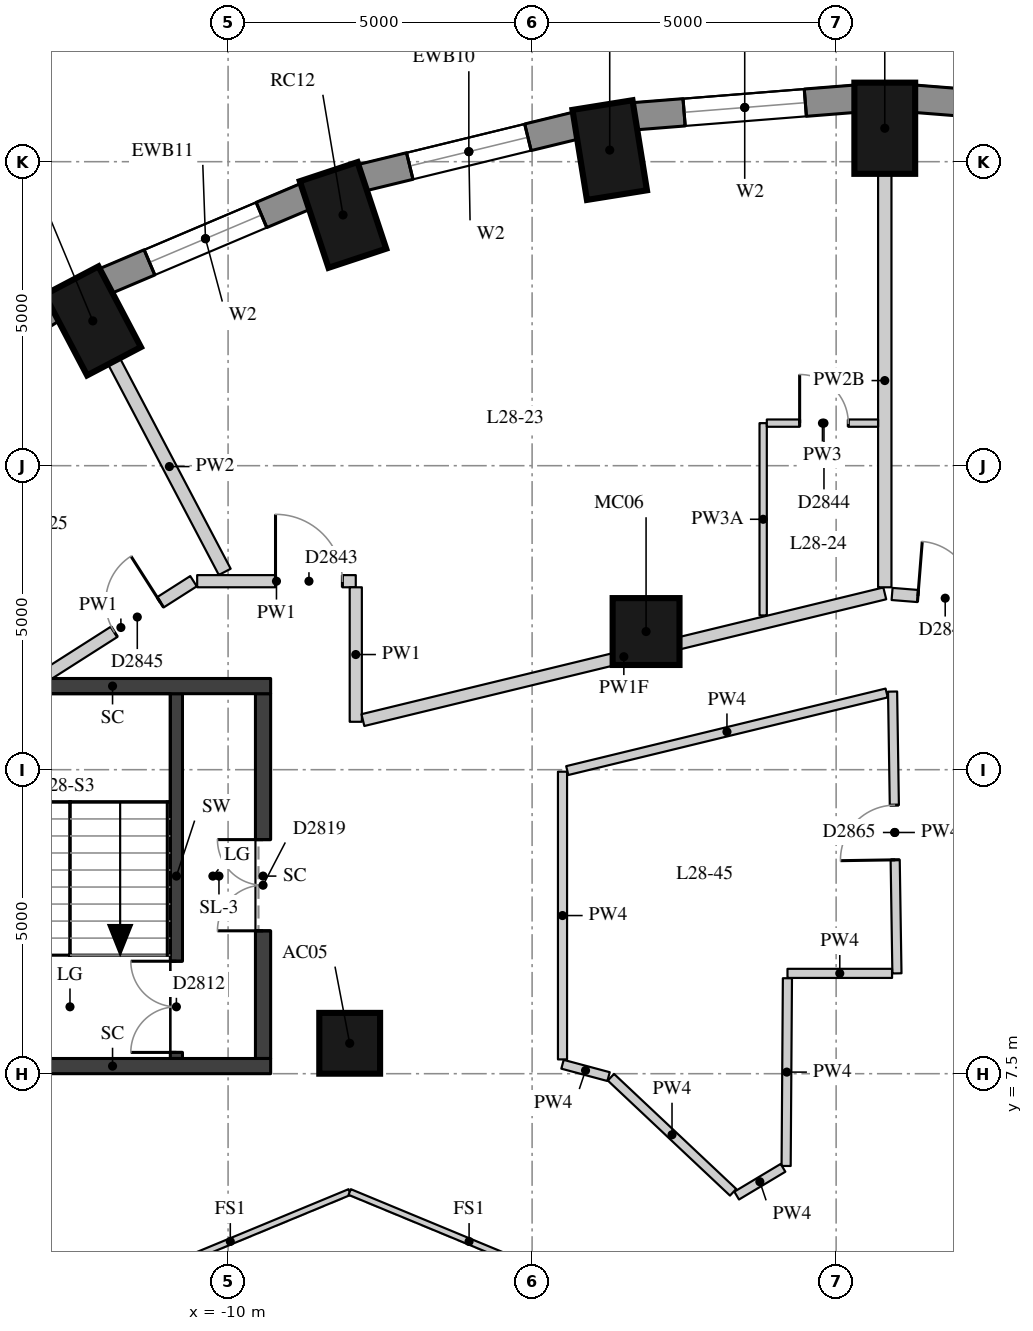
"""IFC4 building model, lengths in metres.
Left out: names, types, materials, properties, quantities, classifications, styles, units other than length and angle.
Written with IfcOpenShell. Run it as: python <this file> out.ifc"""

import sys

from ifc_helpers import new_model, si_unit, direction, frame, frame_2d, origin, origin_2d, place, context, subcontext, project, spatial, rectangle, extrude, element, fill, save


model = new_model("IFC4")
c1 = context("Model", 3, precision=1e-05, world=origin(), true_north=direction((0.0, 1.0)))
c2 = subcontext(c1, "Body", "Model", "MODEL_VIEW")
j1 = project(units=[si_unit("LENGTHUNIT", "METRE"), si_unit("PLANEANGLEUNIT", "RADIAN")], contexts=[c1])
p1 = place(None, origin())
s1 = spatial("IfcSite", under=j1, at=p1, CompositionType="ELEMENT")
p2 = place(p1, origin())
s2 = spatial("IfcBuilding", under=s1, at=p2, CompositionType="ELEMENT")
p3 = place(p2, frame((0.0, 0.0, 102.1)))
s3 = spatial("IfcBuildingStorey", under=s2, at=p3, CompositionType="ELEMENT", Elevation=102.1)
for number, where, z_axis, x_axis in (
    (1, (0.8, 23.05, 0.0), (0.0, 0.0, 1.0), (0.0, 1.0, 0.0)),
    (2, (-3.724, 22.691, 0.0), (0.0, 0.0, 1.0), (-0.159, 0.987, 0.0)),
    (3, (-8.11, 21.624, 0.0), (0.0, 0.0, 1.0), (-0.315, 0.949, 0.0)),
    (4, (-12.225, 19.882, 0.0), (0.0, 0.0, 1.0), (-0.465, 0.885, 0.0)),
):
    element("IfcColumn", number, at=place(p3, frame(where, z_axis=z_axis, x_axis=x_axis)), inside=s3, PredefinedType="COLUMN", context=c2, shape_type="SweptSolid", body=[
        extrude(rectangle(XDim=1.5, YDim=1.0, at=origin_2d()), origin(), (0.0, 0.0, 1.0), 3.3),
    ])
p4 = place(p3, frame((-8.0, 8.0, 0.0), z_axis=(0.0, 0.0, 1.0), x_axis=(1.0, 0.0, 0.0)))
e5 = element("IfcColumn", 5, at=p4, inside=s3, PredefinedType="COLUMN", context=c2, shape_type="SweptSolid", body=[
    extrude(rectangle(XDim=1.0, YDim=1.0, at=origin_2d()), origin(), (0.0, 0.0, 1.0), 3.3),
])
p5 = place(p3, frame((-3.126, 14.772, 0.0), z_axis=(0.0, 0.0, 1.0), x_axis=(1.0, 0.0, 0.0)))
e6 = element("IfcColumn", 6, at=p5, inside=s3, PredefinedType="COLUMN", context=c2, shape_type="SweptSolid", body=[
    extrude(rectangle(XDim=1.1, YDim=1.1, at=origin_2d()), origin(), (0.0, 0.0, 1.0), 3.3),
])
p6 = place(p3, frame((4.927, 23.247, 0.0), z_axis=(0.0, 0.0, 1.0), x_axis=(-0.996862216754, 0.079156306178, 0.0)))
e7 = element("IfcWall", 7, at=p6, inside=s3, PredefinedType="SOLIDWALL", context=c2, shape_type="SweptSolid", body=[
    extrude(rectangle(XDim=3.658, YDim=0.45, at=frame_2d((1.829, 0.0))), origin(), (0.0, 0.0, 1.0), 3.02),
])
p7 = place(p6, frame((0.829, 0.0, 0.4)))
e8 = element("IfcOpeningElement", 8, at=p7, cuts=e7, PredefinedType="OPENING", context=c2, shape_type="SweptSolid", body=[
    extrude(rectangle(XDim=2.0, YDim=1.75, at=frame_2d((1.0, 0.875))), frame((0.0, 0.235, 0.0), z_axis=(0.0, -1.0, 0.0), x_axis=(1.0, 0.0, 0.0)), (0.0, 0.0, 1.0), 0.47),
])
p8 = place(p3, frame((0.32, 23.536, 0.0), z_axis=(0.0, 0.0, 1.0), x_axis=(-0.996862216754, -0.079156306178, 0.0)))
e9 = element("IfcWall", 9, at=p8, inside=s3, PredefinedType="SOLIDWALL", context=c2, shape_type="SweptSolid", body=[
    extrude(rectangle(XDim=3.658, YDim=0.45, at=frame_2d((1.829, 0.0))), origin(), (0.0, 0.0, 1.0), 3.02),
])
p9 = place(p8, frame((0.829, 0.0, 0.4)))
e10 = element("IfcOpeningElement", 10, at=p9, cuts=e9, PredefinedType="OPENING", context=c2, shape_type="SweptSolid", body=[
    extrude(rectangle(XDim=2.0, YDim=1.75, at=frame_2d((1.0, 0.875))), frame((0.0, 0.235, 0.0), z_axis=(0.0, -1.0, 0.0), x_axis=(1.0, 0.0, 0.0)), (0.0, 0.0, 1.0), 0.47),
])
p10 = place(p3, frame((-4.275, 23.094, 0.0), z_axis=(0.0, 0.0, 1.0), x_axis=(-0.971667603162, -0.236351579148, 0.0)))
e11 = element("IfcWall", 11, at=p10, inside=s3, PredefinedType="SOLIDWALL", context=c2, shape_type="SweptSolid", body=[
    extrude(rectangle(XDim=3.635, YDim=0.45, at=frame_2d((1.817, 0.0))), origin(), (0.0, 0.0, 1.0), 3.02),
])
p11 = place(p10, frame((0.817, 0.0, 0.4)))
e12 = element("IfcOpeningElement", 12, at=p11, cuts=e11, PredefinedType="OPENING", context=c2, shape_type="SweptSolid", body=[
    extrude(rectangle(XDim=2.0, YDim=1.75, at=frame_2d((1.0, 0.875))), frame((0.0, 0.235, 0.0), z_axis=(0.0, -1.0, 0.0), x_axis=(1.0, 0.0, 0.0)), (0.0, 0.0, 1.0), 0.47),
])
p12 = place(p3, frame((-8.718, 21.934, 0.0), z_axis=(0.0, 0.0, 1.0), x_axis=(-0.920879975612, -0.389846213932, 0.0)))
e13 = element("IfcWall", 13, at=p12, inside=s3, PredefinedType="SOLIDWALL", context=c2, shape_type="SweptSolid", body=[
    extrude(rectangle(XDim=3.592, YDim=0.45, at=frame_2d((1.796, 0.0))), origin(), (0.0, 0.0, 1.0), 3.02),
])
p13 = place(p12, frame((0.796, 0.0, 0.4)))
e14 = element("IfcOpeningElement", 14, at=p13, cuts=e13, PredefinedType="OPENING", context=c2, shape_type="SweptSolid", body=[
    extrude(rectangle(XDim=2.0, YDim=1.75, at=frame_2d((1.0, 0.875))), frame((0.0, 0.235, 0.0), z_axis=(0.0, -1.0, 0.0), x_axis=(1.0, 0.0, 0.0)), (0.0, 0.0, 1.0), 0.47),
])
p14 = place(p3, frame((-12.875, 20.087, 0.0), z_axis=(0.0, 0.0, 1.0), x_axis=(-0.843860651879, -0.536562391722, 0.0)))
e15 = element("IfcWall", 15, at=p14, inside=s3, PredefinedType="SOLIDWALL", context=c2, shape_type="SweptSolid", body=[
    extrude(rectangle(XDim=3.532, YDim=0.45, at=frame_2d((1.766, 0.0))), origin(), (0.0, 0.0, 1.0), 3.02),
])
p15 = place(p14, frame((0.766, 0.0, 0.4)))
e16 = element("IfcOpeningElement", 16, at=p15, cuts=e15, PredefinedType="OPENING", context=c2, shape_type="SweptSolid", body=[
    extrude(rectangle(XDim=2.0, YDim=1.75, at=frame_2d((1.0, 0.875))), frame((0.0, 0.235, 0.0), z_axis=(0.0, -1.0, 0.0), x_axis=(1.0, 0.0, 0.0)), (0.0, 0.0, 1.0), 0.47),
])
p16 = place(p3, frame((-10.85, 7.75, 0.0), z_axis=(0.0, 0.0, 1.0), x_axis=(0.0, 1.0, 0.0)))
e17 = element("IfcWall", 17, at=p16, inside=s3, PredefinedType="SHEAR", context=c2, shape_type="SweptSolid", body=[
    extrude(rectangle(XDim=6.0, YDim=0.2, at=frame_2d((3.0, 0.0))), origin(), (0.0, 0.0, 1.0), 3.02),
])
p17 = place(p16, frame((0.1, 0.0, 0.0)))
e18 = element("IfcOpeningElement", 18, at=p17, cuts=e17, PredefinedType="OPENING", context=c2, shape_type="SweptSolid", body=[
    extrude(rectangle(XDim=1.5, YDim=2.1, at=frame_2d((0.75, 1.05))), frame((0.0, 0.11, 0.0), z_axis=(0.0, -1.0, 0.0), x_axis=(1.0, 0.0, 0.0)), (0.0, 0.0, 1.0), 0.22),
])
p18 = place(p3, frame((-9.425, 7.75, -0.28), z_axis=(0.0, 0.0, 1.0), x_axis=(0.0, 1.0, 0.0)))
e19 = element("IfcWall", 19, at=p18, inside=s3, PredefinedType="SHEAR", context=c2, shape_type="SweptSolid", body=[
    extrude(rectangle(XDim=6.0, YDim=0.25, at=frame_2d((3.0, 0.0))), origin(), (0.0, 0.0, 1.0), 3.3),
])
p19 = place(p18, frame((2.1, 0.0, 0.28)))
e20 = element("IfcOpeningElement", 20, at=p19, cuts=e19, PredefinedType="OPENING", context=c2, shape_type="SweptSolid", body=[
    extrude(rectangle(XDim=1.5, YDim=2.1, at=frame_2d((0.75, 1.05))), frame((0.0, 0.135, 0.0), z_axis=(0.0, -1.0, 0.0), x_axis=(1.0, 0.0, 0.0)), (0.0, 0.0, 1.0), 0.27),
])
for number, where, z_axis, x_axis in (
    (21, (-14.5, 13.875, -0.28), (0.0, 0.0, 1.0), (1.0, 0.0, 0.0)),
    (22, (-14.5, 7.625, -0.28), (0.0, 0.0, 1.0), (1.0, 0.0, 0.0)),
):
    element("IfcWall", number, at=place(p3, frame(where, z_axis=z_axis, x_axis=x_axis)), inside=s3, PredefinedType="SHEAR", context=c2, shape_type="SweptSolid", body=[
        extrude(rectangle(XDim=5.2, YDim=0.25, at=frame_2d((2.6, 0.0))), origin(), (0.0, 0.0, 1.0), 3.3),
    ])
p20 = place(p3, frame((-12.957, 14.077, 0.0), z_axis=(0.0, 0.0, 1.0), x_axis=(0.84319985174, 0.537600232538, 0.0)))
e23 = element("IfcWall", 23, at=p20, inside=s3, PredefinedType="PARTITIONING", context=c2, shape_type="SweptSolid", body=[
    extrude(rectangle(XDim=2.833, YDim=0.2, at=frame_2d((1.417, 0.0))), origin(), (0.0, 0.0, 1.0), 3.02),
])
p21 = place(p20, frame((1.286, 0.0, 0.0)))
e24 = element("IfcOpeningElement", 24, at=p21, cuts=e23, PredefinedType="OPENING", context=c2, shape_type="SweptSolid", body=[
    extrude(rectangle(XDim=0.9, YDim=2.1, at=frame_2d((0.45, 1.05))), frame((0.0, 0.11, 0.0), z_axis=(0.0, -1.0, 0.0), x_axis=(1.0, 0.0, 0.0)), (0.0, 0.0, 1.0), 0.22),
])
p22 = place(p3, frame((-10.509, 15.6, 0.0), z_axis=(0.0, 0.0, 1.0), x_axis=(1.0, 0.0, 0.0)))
e25 = element("IfcWall", 25, at=p22, inside=s3, PredefinedType="PARTITIONING", context=c2, shape_type="SweptSolid", body=[
    extrude(rectangle(XDim=2.609, YDim=0.2, at=frame_2d((1.304, 0.0))), origin(), (0.0, 0.0, 1.0), 3.02),
])
p23 = place(p22, frame((1.289, 0.0, 0.0)))
e26 = element("IfcOpeningElement", 26, at=p23, cuts=e25, PredefinedType="OPENING", context=c2, shape_type="SweptSolid", body=[
    extrude(rectangle(XDim=1.1, YDim=2.1, at=frame_2d((0.55, 1.05))), frame((0.0, 0.11, 0.0), z_axis=(0.0, -1.0, 0.0), x_axis=(1.0, 0.0, 0.0)), (0.0, 0.0, 1.0), 0.22),
])
p24 = place(p3, frame((-7.9, 15.5, 0.0), z_axis=(0.0, 0.0, 1.0), x_axis=(0.0, -1.0, 0.0)))
e27 = element("IfcWall", 27, at=p24, inside=s3, PredefinedType="PARTITIONING", context=c2, shape_type="SweptSolid", body=[
    extrude(rectangle(XDim=2.212, YDim=0.2, at=frame_2d((1.106, 0.0))), origin(), (0.0, 0.0, 1.0), 3.02),
])
p25 = place(p3, frame((-7.783, 13.316, 0.0), z_axis=(0.0, 0.0, 1.0), x_axis=(0.971757778997, 0.23598054784, 0.0)))
e28 = element("IfcWall", 28, at=p25, inside=s3, PredefinedType="PARTITIONING", context=c2, shape_type="SweptSolid", body=[
    extrude(rectangle(XDim=8.832, YDim=0.2, at=frame_2d((4.416, 0.0))), origin(), (0.0, 0.0, 1.0), 2.42),
])
p26 = place(p3, frame((0.92, 15.39, 0.0), z_axis=(0.0, 0.0, 1.0), x_axis=(0.996853106713, -0.07927095077, 0.0)))
e29 = element("IfcWall", 29, at=p26, inside=s3, PredefinedType="PARTITIONING", context=c2, shape_type="SweptSolid", body=[
    extrude(rectangle(XDim=3.212, YDim=0.2, at=frame_2d((1.606, 0.0))), origin(), (0.0, 0.0, 1.0), 2.42),
])
p27 = place(p26, frame((0.427, 0.0, 0.0)))
e30 = element("IfcOpeningElement", 30, at=p27, cuts=e29, PredefinedType="OPENING", context=c2, shape_type="SweptSolid", body=[
    extrude(rectangle(XDim=0.9, YDim=2.1, at=frame_2d((0.45, 1.05))), frame((0.0, 0.11, 0.0), z_axis=(0.0, -1.0, 0.0), x_axis=(1.0, 0.0, 0.0)), (0.0, 0.0, 1.0), 0.22),
])
p28 = place(p3, frame((0.928, 13.785, 0.0), z_axis=(0.0, 0.0, 1.0), x_axis=(0.015432211783, -0.999880916329, 0.0)))
e31 = element("IfcWall", 31, at=p28, inside=s3, PredefinedType="PARTITIONING", context=c2, shape_type="SweptSolid", body=[
    extrude(rectangle(XDim=4.635, YDim=0.15, at=frame_2d((2.318, 0.0))), origin(), (0.0, 0.0, 1.0), 3.02),
])
p29 = place(p28, frame((1.868, 0.0, 0.0)))
e32 = element("IfcOpeningElement", 32, at=p29, cuts=e31, PredefinedType="OPENING", context=c2, shape_type="SweptSolid", body=[
    extrude(rectangle(XDim=0.9, YDim=2.1, at=frame_2d((0.45, 1.05))), frame((0.0, 0.085, 0.0), z_axis=(0.0, -1.0, 0.0), x_axis=(1.0, 0.0, 0.0)), (0.0, 0.0, 1.0), 0.17),
])
p30 = place(p3, frame((0.92, 9.15, 0.0), z_axis=(0.0, 0.0, 1.0), x_axis=(-1.0, 0.0, 0.0)))
e33 = element("IfcWall", 33, at=p30, inside=s3, PredefinedType="PARTITIONING", context=c2, shape_type="SweptSolid", body=[
    extrude(rectangle(XDim=1.72, YDim=0.15, at=frame_2d((0.86, 0.0))), origin(), (0.0, 0.0, 1.0), 3.02),
])
p31 = place(p3, frame((-0.801, 9.07, 0.0), z_axis=(0.0, 0.0, 1.0), x_axis=(-0.006879482938, -0.999976336077, 0.0)))
e34 = element("IfcWall", 34, at=p31, inside=s3, PredefinedType="PARTITIONING", context=c2, shape_type="SweptSolid", body=[
    extrude(rectangle(XDim=3.087, YDim=0.15, at=frame_2d((1.544, 0.0))), origin(), (0.0, 0.0, 1.0), 3.02),
])
p32 = place(p3, frame((-0.874, 5.952, 0.0), z_axis=(0.0, 0.0, 1.0), x_axis=(-0.857759476535, -0.514051242984, 0.0)))
e35 = element("IfcWall", 35, at=p32, inside=s3, PredefinedType="PARTITIONING", context=c2, shape_type="SweptSolid", body=[
    extrude(rectangle(XDim=0.889, YDim=0.15, at=frame_2d((0.444, 0.0))), origin(), (0.0, 0.0, 1.0), 3.02),
])
p33 = place(p3, frame((-1.694, 5.55, 0.0), z_axis=(0.0, 0.0, 1.0), x_axis=(-0.728018179622, 0.685557824067, 0.0)))
e36 = element("IfcWall", 36, at=p33, inside=s3, PredefinedType="PARTITIONING", context=c2, shape_type="SweptSolid", body=[
    extrude(rectangle(XDim=2.76, YDim=0.15, at=frame_2d((1.38, 0.0))), origin(), (0.0, 0.0, 1.0), 3.02),
])
p34 = place(p3, frame((-3.742, 7.452, 0.0), z_axis=(0.0, 0.0, 1.0), x_axis=(-0.965903596155, 0.258901994846, 0.0)))
e37 = element("IfcWall", 37, at=p34, inside=s3, PredefinedType="PARTITIONING", context=c2, shape_type="SweptSolid", body=[
    extrude(rectangle(XDim=0.785, YDim=0.15, at=frame_2d((0.392, 0.0))), origin(), (0.0, 0.0, 1.0), 3.02),
])
p35 = place(p3, frame((-4.5, 7.735, 0.0), z_axis=(0.0, 0.0, 1.0), x_axis=(0.0, 1.0, 0.0)))
e38 = element("IfcWall", 38, at=p35, inside=s3, PredefinedType="PARTITIONING", context=c2, shape_type="SweptSolid", body=[
    extrude(rectangle(XDim=4.732, YDim=0.15, at=frame_2d((2.366, 0.0))), origin(), (0.0, 0.0, 1.0), 3.02),
])
p36 = place(p3, frame((-4.422, 12.485, 0.0), z_axis=(0.0, 0.0, 1.0), x_axis=(0.971733724628, 0.236079580694, 0.0)))
e39 = element("IfcWall", 39, at=p36, inside=s3, PredefinedType="PARTITIONING", context=c2, shape_type="SweptSolid", body=[
    extrude(rectangle(XDim=5.406, YDim=0.15, at=frame_2d((2.703, 0.0))), origin(), (0.0, 0.0, 1.0), 3.02),
])
p37 = place(p3, frame((0.8, 22.3, 0.0), z_axis=(0.0, 0.0, 1.0), x_axis=(0.0, -1.0, 0.0)))
e40 = element("IfcWall", 40, at=p37, inside=s3, PredefinedType="PARTITIONING", context=c2, shape_type="SweptSolid", body=[
    extrude(rectangle(XDim=6.8, YDim=0.22, at=frame_2d((3.4, 0.0))), origin(), (0.0, 0.0, 1.0), 2.57),
])
p38 = place(p3, frame((-11.876, 19.218, 0.0), z_axis=(0.0, 0.0, 1.0), x_axis=(0.465386433174, -0.885107602395, 0.0)))
e41 = element("IfcWall", 41, at=p38, inside=s3, PredefinedType="PARTITIONING", context=c2, shape_type="SweptSolid", body=[
    extrude(rectangle(XDim=3.914, YDim=0.22, at=frame_2d((1.957, 0.0))), origin(), (0.0, 0.0, 1.0), 3.02),
])
p39 = place(p3, frame((-1.2, 15.037, 0.0), z_axis=(0.0, 0.0, 1.0), x_axis=(0.0, 1.0, 0.0)))
e42 = element("IfcWall", 42, at=p39, inside=s3, PredefinedType="PARTITIONING", context=c2, shape_type="SweptSolid", body=[
    extrude(rectangle(XDim=3.163, YDim=0.12, at=frame_2d((1.581, 0.0))), origin(), (0.0, 0.0, 1.0), 2.57),
])
p40 = place(p3, frame((-1.14, 18.2, 0.0), z_axis=(0.0, 0.0, 1.0), x_axis=(1.0, 0.0, 0.0)))
e43 = element("IfcWall", 43, at=p40, inside=s3, PredefinedType="PARTITIONING", context=c2, shape_type="SweptSolid", body=[
    extrude(rectangle(XDim=1.83, YDim=0.12, at=frame_2d((0.915, 0.0))), origin(), (0.0, 0.0, 1.0), 3.02),
])
p41 = place(p40, frame((0.54, 0.0, 0.0)))
e44 = element("IfcOpeningElement", 44, at=p41, cuts=e43, PredefinedType="OPENING", context=c2, shape_type="SweptSolid", body=[
    extrude(rectangle(XDim=0.8, YDim=2.1, at=frame_2d((0.4, 1.05))), frame((0.0, 0.07, 0.0), z_axis=(0.0, -1.0, 0.0), x_axis=(1.0, 0.0, 0.0)), (0.0, 0.0, 1.0), 0.14),
])
for number, where, z_axis, x_axis in (
    (45, (-11.927, 3.927, 0.0), (0.0, 0.0, 1.0), (0.924, 0.383, 0.0)),
    (46, (-8.0, 5.554, 0.0), (0.0, 0.0, 1.0), (0.924, -0.383, 0.0)),
):
    element("IfcWall", number, at=place(p3, frame(where, z_axis=z_axis, x_axis=x_axis)), inside=s3, PredefinedType="PARTITIONING", context=c2, shape_type="SweptSolid", body=[
        extrude(rectangle(XDim=4.251, YDim=0.1, at=frame_2d((2.125, 0.0))), origin(), (0.0, 0.0, 1.0), 3.02),
    ])
p42 = place(p9, origin())
e47 = element("IfcWindow", 47, at=p42, inside=s3, PartitioningType="SINGLE_PANEL", PredefinedType="WINDOW", context=c2, shape_type="SweptSolid", body=[
    extrude(rectangle(XDim=2.0, YDim=1.75, at=frame_2d((1.0, 0.875))), frame((0.0, 0.035, 0.0), z_axis=(0.0, -1.0, 0.0), x_axis=(1.0, 0.0, 0.0)), (0.0, 0.0, 1.0), 0.06),
])
fill(e10, e47)
p43 = place(p11, origin())
e48 = element("IfcWindow", 48, at=p43, inside=s3, PartitioningType="SINGLE_PANEL", PredefinedType="WINDOW", context=c2, shape_type="SweptSolid", body=[
    extrude(rectangle(XDim=2.0, YDim=1.75, at=frame_2d((1.0, 0.875))), frame((0.0, 0.035, 0.0), z_axis=(0.0, -1.0, 0.0), x_axis=(1.0, 0.0, 0.0)), (0.0, 0.0, 1.0), 0.06),
])
fill(e12, e48)
p44 = place(p13, origin())
e49 = element("IfcWindow", 49, at=p44, inside=s3, PartitioningType="SINGLE_PANEL", PredefinedType="WINDOW", context=c2, shape_type="SweptSolid", body=[
    extrude(rectangle(XDim=2.0, YDim=1.75, at=frame_2d((1.0, 0.875))), frame((0.0, 0.035, 0.0), z_axis=(0.0, -1.0, 0.0), x_axis=(1.0, 0.0, 0.0)), (0.0, 0.0, 1.0), 0.06),
])
fill(e14, e49)
p45 = place(p17, origin())
e50 = element("IfcDoor", 50, at=p45, inside=s3, OperationType="DOUBLE_DOOR_SINGLE_SWING", PredefinedType="DOOR", context=c2, shape_type="SweptSolid", body=[
    extrude(rectangle(XDim=1.5, YDim=2.1, at=frame_2d((0.75, 1.05))), frame((0.0, 0.025, 0.0), z_axis=(0.0, -1.0, 0.0), x_axis=(1.0, 0.0, 0.0)), (0.0, 0.0, 1.0), 0.05),
])
fill(e18, e50)
p46 = place(p19, origin())
e51 = element("IfcDoor", 51, at=p46, inside=s3, OperationType="DOUBLE_DOOR_SINGLE_SWING", PredefinedType="DOOR", context=c2, shape_type="SweptSolid", body=[
    extrude(rectangle(XDim=1.5, YDim=2.1, at=frame_2d((0.75, 1.05))), frame((0.0, 0.025, 0.0), z_axis=(0.0, -1.0, 0.0), x_axis=(1.0, 0.0, 0.0)), (0.0, 0.0, 1.0), 0.05),
])
fill(e20, e51)
p47 = place(p27, origin())
e52 = element("IfcDoor", 52, at=p47, inside=s3, OperationType="SINGLE_SWING_LEFT", PredefinedType="DOOR", context=c2, shape_type="SweptSolid", body=[
    extrude(rectangle(XDim=0.9, YDim=2.1, at=frame_2d((0.45, 1.05))), frame((0.0, 0.025, 0.0), z_axis=(0.0, -1.0, 0.0), x_axis=(1.0, 0.0, 0.0)), (0.0, 0.0, 1.0), 0.05),
])
fill(e30, e52)
p48 = place(p23, origin())
e53 = element("IfcDoor", 53, at=p48, inside=s3, OperationType="SINGLE_SWING_LEFT", PredefinedType="DOOR", context=c2, shape_type="SweptSolid", body=[
    extrude(rectangle(XDim=1.1, YDim=2.1, at=frame_2d((0.55, 1.05))), frame((0.0, 0.025, 0.0), z_axis=(0.0, -1.0, 0.0), x_axis=(1.0, 0.0, 0.0)), (0.0, 0.0, 1.0), 0.05),
])
fill(e26, e53)
p49 = place(p41, origin())
e54 = element("IfcDoor", 54, at=p49, inside=s3, OperationType="SINGLE_SWING_LEFT", PredefinedType="DOOR", context=c2, shape_type="SweptSolid", body=[
    extrude(rectangle(XDim=0.8, YDim=2.1, at=frame_2d((0.4, 1.05))), frame((0.0, 0.025, 0.0), z_axis=(0.0, -1.0, 0.0), x_axis=(1.0, 0.0, 0.0)), (0.0, 0.0, 1.0), 0.05),
])
fill(e44, e54)
p50 = place(p21, origin())
e55 = element("IfcDoor", 55, at=p50, inside=s3, OperationType="SINGLE_SWING_RIGHT", PredefinedType="DOOR", context=c2, shape_type="SweptSolid", body=[
    extrude(rectangle(XDim=0.9, YDim=2.1, at=frame_2d((0.45, 1.05))), frame((0.0, 0.025, 0.0), z_axis=(0.0, -1.0, 0.0), x_axis=(1.0, 0.0, 0.0)), (0.0, 0.0, 1.0), 0.05),
])
fill(e24, e55)
p51 = place(p29, origin())
e56 = element("IfcDoor", 56, at=p51, inside=s3, OperationType="SINGLE_SWING_LEFT", PredefinedType="DOOR", context=c2, shape_type="SweptSolid", body=[
    extrude(rectangle(XDim=0.9, YDim=2.1, at=frame_2d((0.45, 1.05))), frame((0.0, 0.025, 0.0), z_axis=(0.0, -1.0, 0.0), x_axis=(1.0, 0.0, 0.0)), (0.0, 0.0, 1.0), 0.05),
])
fill(e32, e56)
save(model, sys.argv[1])
